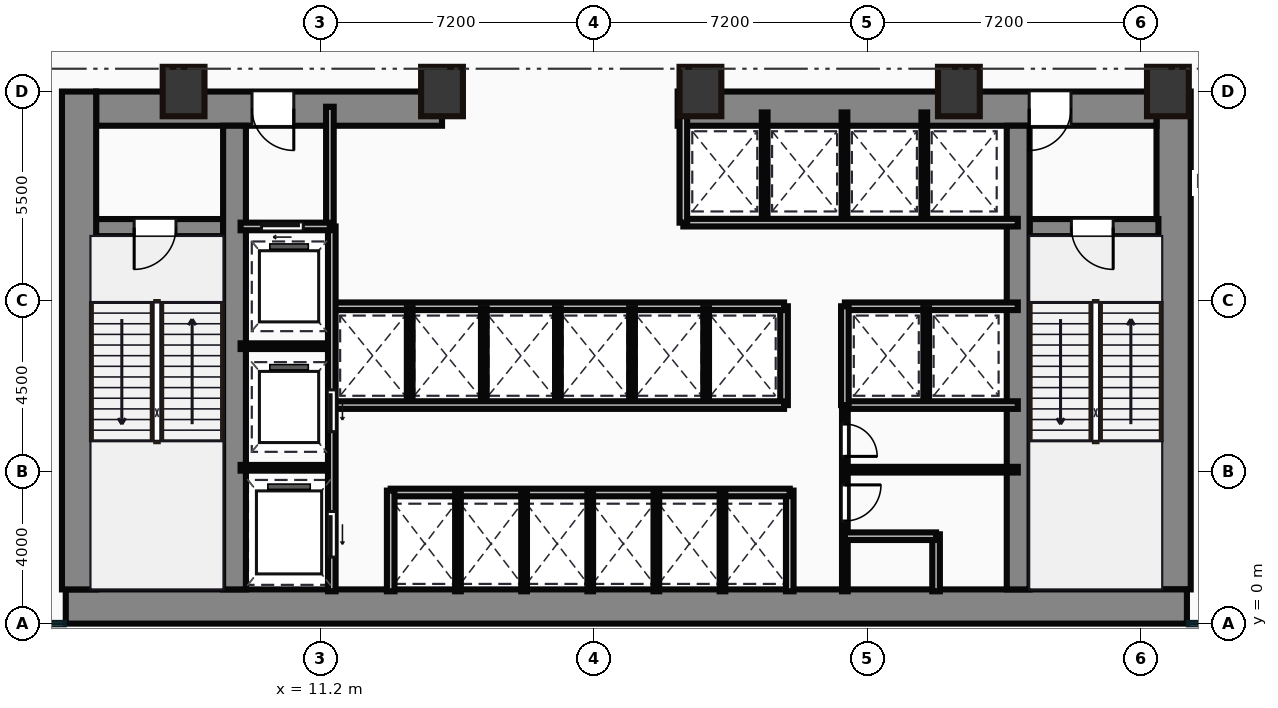
"""IFC4 building model, lengths in metres.
Left out: names, types, materials, properties, quantities, classifications, styles, units other than length and angle.
Written with IfcOpenShell. Run it as: python <this file> out.ifc"""

import sys

from ifc_helpers import new_model, si_unit, direction, frame, frame_2d, origin, origin_2d, place, context, subcontext, project, spatial, rectangle, hollow_rectangle, extrude, source, transform, mapped, element, fill, save


model = new_model("IFC4")
c1 = context("Model", 3, precision=1e-05, world=origin(), true_north=direction((0.0, 1.0)))
c2 = subcontext(c1, "Body", "Model", "MODEL_VIEW")
j1 = project(units=[si_unit("LENGTHUNIT", "METRE"), si_unit("PLANEANGLEUNIT", "RADIAN")], contexts=[c1])
p1 = place(None, origin())
s1 = spatial("IfcSite", under=j1, at=p1, CompositionType="ELEMENT")
p2 = place(p1, origin())
s2 = spatial("IfcBuilding", under=s1, at=p2, CompositionType="ELEMENT")
p3 = place(p2, frame((0.0, 0.0, 11.0)))
s3 = spatial("IfcBuildingStorey", under=s2, at=p3, CompositionType="ELEMENT", Elevation=11.0)
m1 = source(origin(), c2, "Body", "SweptSolid", [
    extrude(rectangle(XDim=29.5, YDim=0.9, at=frame_2d((14.75, 0.0))), origin(), (0.0, 0.0, 1.0), 5.0),
])
p4 = place(p3, frame((4.5, 0.45, 0.0), z_axis=(0.0, 0.0, 1.0), x_axis=(1.0, 0.0, 0.0)))
e1 = element("IfcWall", 1, at=p4, inside=s3, PredefinedType="SHEAR", context=c2, shape_type="MappedRepresentation", body=[
    mapped(m1, transform((0.0, 0.0, 0.0))),
])
m2 = source(origin(), c2, "Body", "SweptSolid", [
    extrude(rectangle(XDim=13.1, YDim=0.9, at=frame_2d((6.55, 0.0))), origin(), (0.0, 0.0, 1.0), 5.0),
])
for number, where, z_axis, x_axis in (
    (2, (4.85, 0.9, 0.0), (0.0, 0.0, 1.0), (0.0, 1.0, 0.0)),
    (3, (33.65, 0.9, 0.0), (0.0, 0.0, 1.0), (0.0, 1.0, 0.0)),
):
    element("IfcWall", number, at=place(p3, frame(where, z_axis=z_axis, x_axis=x_axis)), inside=s3, PredefinedType="SHEAR", context=c2, shape_type="MappedRepresentation", body=[
        mapped(m2, transform((0.0, 0.0, 0.0))),
    ])
m3 = source(origin(), c2, "Body", "SweptSolid", [
    extrude(rectangle(XDim=9.1, YDim=0.9, at=frame_2d((4.55, 0.0))), origin(), (0.0, 0.0, 1.0), 5.0),
])
p5 = place(p3, frame((5.3, 13.55, 0.0), z_axis=(0.0, 0.0, 1.0), x_axis=(1.0, 0.0, 0.0)))
e4 = element("IfcWall", 4, at=p5, inside=s3, PredefinedType="SHEAR", context=c2, shape_type="MappedRepresentation", body=[
    mapped(m3, transform((0.0, 0.0, 0.0))),
])
p6 = place(p5, frame((4.1, 0.0, 0.0)))
e5 = element("IfcOpeningElement", 5, at=p6, cuts=e4, PredefinedType="OPENING", context=c2, shape_type="SweptSolid", body=[
    extrude(rectangle(XDim=1.1, YDim=2.15, at=frame_2d((0.55, 1.075))), frame((0.0, 0.46, 0.0), z_axis=(0.0, -1.0, 0.0), x_axis=(1.0, 0.0, 0.0)), (0.0, 0.0, 1.0), 0.92),
])
m4 = source(origin(), c2, "Body", "SweptSolid", [
    extrude(rectangle(XDim=12.6, YDim=0.9, at=frame_2d((6.3, 0.0))), origin(), (0.0, 0.0, 1.0), 5.0),
])
p7 = place(p3, frame((20.6, 13.55, 0.0), z_axis=(0.0, 0.0, 1.0), x_axis=(1.0, 0.0, 0.0)))
e6 = element("IfcWall", 6, at=p7, inside=s3, PredefinedType="SHEAR", context=c2, shape_type="MappedRepresentation", body=[
    mapped(m4, transform((0.0, 0.0, 0.0))),
])
p8 = place(p7, frame((9.25, 0.0, 0.0)))
e7 = element("IfcOpeningElement", 7, at=p8, cuts=e6, PredefinedType="OPENING", context=c2, shape_type="SweptSolid", body=[
    extrude(rectangle(XDim=1.1, YDim=2.15, at=frame_2d((0.55, 1.075))), frame((0.0, 0.46, 0.0), z_axis=(0.0, -1.0, 0.0), x_axis=(1.0, 0.0, 0.0)), (0.0, 0.0, 1.0), 0.92),
])
m5 = source(origin(), c2, "Body", "SweptSolid", [
    extrude(rectangle(XDim=12.2, YDim=0.6, at=frame_2d((6.1, 0.0))), origin(), (0.0, 0.0, 1.0), 5.0),
])
for number, where, z_axis, x_axis in (
    (8, (8.94, 0.9, 0.0), (0.0, 0.0, 1.0), (0.0, 1.0, 0.0)),
    (9, (29.56, 0.9, 0.0), (0.0, 0.0, 1.0), (0.0, 1.0, 0.0)),
):
    element("IfcWall", number, at=place(p3, frame(where, z_axis=z_axis, x_axis=x_axis)), inside=s3, PredefinedType="SHEAR", context=c2, shape_type="MappedRepresentation", body=[
        mapped(m5, transform((0.0, 0.0, 0.0))),
    ])
m6 = source(origin(), c2, "Body", "SweptSolid", [
    extrude(rectangle(XDim=3.39, YDim=0.45, at=frame_2d((1.695, 0.0))), origin(), (0.0, 0.0, 1.0), 5.0),
])
p9 = place(p3, frame((5.25, 10.42, 0.0), z_axis=(0.0, 0.0, 1.0), x_axis=(1.0, 0.0, 0.0)))
e10 = element("IfcWall", 10, at=p9, inside=s3, PredefinedType="SHEAR", context=c2, shape_type="MappedRepresentation", body=[
    mapped(m6, transform((0.0, 0.0, 0.0))),
])
p10 = place(p9, frame((1.05, 0.0, 0.0)))
e11 = element("IfcOpeningElement", 11, at=p10, cuts=e10, PredefinedType="OPENING", context=c2, shape_type="SweptSolid", body=[
    extrude(rectangle(XDim=1.1, YDim=2.15, at=frame_2d((0.55, 1.075))), frame((0.0, 0.235, 0.0), z_axis=(0.0, -1.0, 0.0), x_axis=(1.0, 0.0, 0.0)), (0.0, 0.0, 1.0), 0.47),
])
p11 = place(p3, frame((29.86, 10.42, 0.0), z_axis=(0.0, 0.0, 1.0), x_axis=(1.0, 0.0, 0.0)))
e12 = element("IfcWall", 12, at=p11, inside=s3, PredefinedType="SHEAR", context=c2, shape_type="MappedRepresentation", body=[
    mapped(m6, transform((0.0, 0.0, 0.0))),
])
p12 = place(p11, frame((1.1, 0.0, 0.0)))
e13 = element("IfcOpeningElement", 13, at=p12, cuts=e12, PredefinedType="OPENING", context=c2, shape_type="SweptSolid", body=[
    extrude(rectangle(XDim=1.1, YDim=2.15, at=frame_2d((0.55, 1.075))), frame((0.0, 0.235, 0.0), z_axis=(0.0, -1.0, 0.0), x_axis=(1.0, 0.0, 0.0)), (0.0, 0.0, 1.0), 0.47),
])
m7 = source(origin(), c2, "Body", "SweptSolid", [
    extrude(hollow_rectangle(XDim=1.1, YDim=1.3, WallThickness=0.055, at=origin_2d()), origin(), (0.0, 0.0, 1.0), 5.0),
])
for number, where, z_axis, x_axis in (
    (14, (7.6, 14.0, 0.0), (0.0, 0.0, 1.0), (1.0, 0.0, 0.0)),
    (15, (14.4, 14.0, 0.0), (0.0, 0.0, 1.0), (1.0, 0.0, 0.0)),
    (16, (21.2, 14.0, 0.0), (0.0, 0.0, 1.0), (1.0, 0.0, 0.0)),
    (17, (28.0, 14.0, 0.0), (0.0, 0.0, 1.0), (1.0, 0.0, 0.0)),
    (18, (33.5, 14.0, 0.0), (0.0, 0.0, 1.0), (1.0, 0.0, 0.0)),
):
    element("IfcColumn", number, at=place(p3, frame(where, z_axis=z_axis, x_axis=x_axis)), inside=s3, PredefinedType="PILASTER", context=c2, shape_type="MappedRepresentation", body=[
        mapped(m7, transform((0.0, 0.0, 0.0))),
    ])
m8 = source(origin(), c2, "Body", "SweptSolid", [
    extrude(rectangle(XDim=3.18, YDim=0.2, at=frame_2d((1.59, 0.0))), origin(), (0.0, 0.0, 1.0), 4.7),
])
p13 = place(p3, frame((11.45, 10.42, 0.0), z_axis=(0.0, 0.0, 1.0), x_axis=(0.0, 1.0, 0.0)))
e19 = element("IfcWall", 19, at=p13, inside=s3, PredefinedType="PARTITIONING", context=c2, shape_type="MappedRepresentation", body=[
    mapped(m8, transform((0.0, 0.0, 0.0))),
])
m9 = source(origin(), c2, "Body", "SweptSolid", [
    extrude(rectangle(XDim=2.35, YDim=0.2, at=frame_2d((1.175, 0.0))), origin(), (0.0, 0.0, 1.0), 4.7),
])
p14 = place(p3, frame((9.1, 10.45, 0.0), z_axis=(0.0, 0.0, 1.0), x_axis=(1.0, 0.0, 0.0)))
e20 = element("IfcWall", 20, at=p14, inside=s3, PredefinedType="PARTITIONING", context=c2, shape_type="MappedRepresentation", body=[
    mapped(m9, transform((0.0, 0.0, 0.0))),
])
p15 = place(p14, frame((0.55, 0.0, 0.0)))
e21 = element("IfcOpeningElement", 21, at=p15, cuts=e20, PredefinedType="OPENING", context=c2, shape_type="SweptSolid", body=[
    extrude(rectangle(XDim=1.1, YDim=2.15, at=frame_2d((0.55, 1.075))), frame((0.0, 0.11, 0.0), z_axis=(0.0, -1.0, 0.0), x_axis=(1.0, 0.0, 0.0)), (0.0, 0.0, 1.0), 0.22),
])
m10 = source(origin(), c2, "Body", "SweptSolid", [
    extrude(rectangle(XDim=9.6, YDim=0.2, at=frame_2d((4.8, 0.0))), origin(), (0.0, 0.0, 1.0), 4.7),
])
p16 = place(p3, frame((11.5, 0.85, 0.0), z_axis=(0.0, 0.0, 1.0), x_axis=(0.0, 1.0, 0.0)))
e22 = element("IfcWall", 22, at=p16, inside=s3, PredefinedType="PARTITIONING", context=c2, shape_type="MappedRepresentation", body=[
    mapped(m10, transform((0.0, 0.0, 0.0))),
])
p17 = place(p16, frame((4.2, 0.0, 0.0)))
e23 = element("IfcOpeningElement", 23, at=p17, cuts=e22, PredefinedType="OPENING", context=c2, shape_type="SweptSolid", body=[
    extrude(rectangle(XDim=1.1, YDim=2.15, at=frame_2d((0.55, 1.075))), frame((0.0, 0.11, 0.0), z_axis=(0.0, -1.0, 0.0), x_axis=(1.0, 0.0, 0.0)), (0.0, 0.0, 1.0), 0.22),
])
p18 = place(p16, frame((0.9, 0.0, 0.0)))
e24 = element("IfcOpeningElement", 24, at=p18, cuts=e22, PredefinedType="OPENING", context=c2, shape_type="SweptSolid", body=[
    extrude(rectangle(XDim=1.2, YDim=2.15, at=frame_2d((0.6, 1.075))), frame((0.0, 0.11, 0.0), z_axis=(0.0, -1.0, 0.0), x_axis=(1.0, 0.0, 0.0)), (0.0, 0.0, 1.0), 0.22),
])
m11 = source(origin(), c2, "Body", "SweptSolid", [
    extrude(rectangle(XDim=2.4, YDim=0.15, at=frame_2d((1.2, 0.0))), origin(), (0.0, 0.0, 1.0), 4.7),
])
for number, where, z_axis, x_axis in (
    (25, (9.1, 4.1, 0.0), (0.0, 0.0, 1.0), (1.0, 0.0, 0.0)),
    (26, (9.1, 7.3, 0.0), (0.0, 0.0, 1.0), (1.0, 0.0, 0.0)),
):
    element("IfcWall", number, at=place(p3, frame(where, z_axis=z_axis, x_axis=x_axis)), inside=s3, PredefinedType="PARTITIONING", context=c2, shape_type="MappedRepresentation", body=[
        mapped(m11, transform((0.0, 0.0, 0.0))),
    ])
m12 = source(origin(), c2, "Body", "SweptSolid", [
    extrude(rectangle(XDim=2.65, YDim=0.2, at=frame_2d((1.325, 0.0))), origin(), (0.0, 0.0, 1.0), 4.7),
])
p19 = place(p3, frame((13.05, 0.85, 0.0), z_axis=(0.0, 0.0, 1.0), x_axis=(0.0, 1.0, 0.0)))
e27 = element("IfcWall", 27, at=p19, inside=s3, PredefinedType="PARTITIONING", context=c2, shape_type="MappedRepresentation", body=[
    mapped(m12, transform((0.0, 0.0, 0.0))),
])
m13 = source(origin(), c2, "Body", "SweptSolid", [
    extrude(rectangle(XDim=10.5, YDim=0.2, at=frame_2d((5.25, 0.0))), origin(), (0.0, 0.0, 1.0), 4.7),
])
p20 = place(p3, frame((13.05, 3.45, 0.0), z_axis=(0.0, 0.0, 1.0), x_axis=(1.0, 0.0, 0.0)))
e28 = element("IfcWall", 28, at=p20, inside=s3, PredefinedType="PARTITIONING", context=c2, shape_type="MappedRepresentation", body=[
    mapped(m13, transform((0.0, 0.0, 0.0))),
])
p21 = place(p3, frame((23.55, 0.85, 0.0), z_axis=(0.0, 0.0, 1.0), x_axis=(0.0, 1.0, 0.0)))
e29 = element("IfcWall", 29, at=p21, inside=s3, PredefinedType="PARTITIONING", context=c2, shape_type="MappedRepresentation", body=[
    mapped(m12, transform((0.0, 0.0, 0.0))),
])
m14 = source(origin(), c2, "Body", "SweptSolid", [
    extrude(rectangle(XDim=2.6, YDim=0.15, at=frame_2d((1.3, 0.0))), origin(), (0.0, 0.0, 1.0), 4.7),
])
for number, where, z_axis, x_axis in (
    (30, (14.82, 0.85, 0.0), (0.0, 0.0, 1.0), (0.0, 1.0, 0.0)),
    (31, (16.56, 0.85, 0.0), (0.0, 0.0, 1.0), (0.0, 1.0, 0.0)),
    (32, (18.3, 0.85, 0.0), (0.0, 0.0, 1.0), (0.0, 1.0, 0.0)),
    (33, (20.04, 0.85, 0.0), (0.0, 0.0, 1.0), (0.0, 1.0, 0.0)),
    (34, (21.78, 0.85, 0.0), (0.0, 0.0, 1.0), (0.0, 1.0, 0.0)),
):
    element("IfcWall", number, at=place(p3, frame(where, z_axis=z_axis, x_axis=x_axis)), inside=s3, PredefinedType="PARTITIONING", context=c2, shape_type="MappedRepresentation", body=[
        mapped(m14, transform((0.0, 0.0, 0.0))),
    ])
m15 = source(origin(), c2, "Body", "SweptSolid", [
    extrude(rectangle(XDim=11.85, YDim=0.2, at=frame_2d((5.925, 0.0))), origin(), (0.0, 0.0, 1.0), 4.7),
])
for number, where, z_axis, x_axis in (
    (35, (11.55, 5.75, 0.0), (0.0, 0.0, 1.0), (1.0, 0.0, 0.0)),
    (36, (11.55, 8.35, 0.0), (0.0, 0.0, 1.0), (1.0, 0.0, 0.0)),
):
    element("IfcWall", number, at=place(p3, frame(where, z_axis=z_axis, x_axis=x_axis)), inside=s3, PredefinedType="PARTITIONING", context=c2, shape_type="MappedRepresentation", body=[
        mapped(m15, transform((0.0, 0.0, 0.0))),
    ])
m16 = source(origin(), c2, "Body", "SweptSolid", [
    extrude(rectangle(XDim=2.6, YDim=0.2, at=frame_2d((1.3, 0.0))), origin(), (0.0, 0.0, 1.0), 4.7),
])
p22 = place(p3, frame((23.4, 5.75, 0.0), z_axis=(0.0, 0.0, 1.0), x_axis=(0.0, 1.0, 0.0)))
e37 = element("IfcWall", 37, at=p22, inside=s3, PredefinedType="PARTITIONING", context=c2, shape_type="MappedRepresentation", body=[
    mapped(m16, transform((0.0, 0.0, 0.0))),
])
m17 = source(origin(), c2, "Body", "SweptSolid", [
    extrude(rectangle(XDim=2.5, YDim=0.15, at=frame_2d((1.25, 0.0))), origin(), (0.0, 0.0, 1.0), 4.7),
])
for number, where, z_axis, x_axis in (
    (38, (13.55, 5.8, 0.0), (0.0, 0.0, 1.0), (0.0, 1.0, 0.0)),
    (39, (15.5, 5.8, 0.0), (0.0, 0.0, 1.0), (0.0, 1.0, 0.0)),
    (40, (17.45, 5.8, 0.0), (0.0, 0.0, 1.0), (0.0, 1.0, 0.0)),
    (41, (19.4, 5.8, 0.0), (0.0, 0.0, 1.0), (0.0, 1.0, 0.0)),
    (42, (21.35, 5.8, 0.0), (0.0, 0.0, 1.0), (0.0, 1.0, 0.0)),
):
    element("IfcWall", number, at=place(p3, frame(where, z_axis=z_axis, x_axis=x_axis)), inside=s3, PredefinedType="PARTITIONING", context=c2, shape_type="MappedRepresentation", body=[
        mapped(m17, transform((0.0, 0.0, 0.0))),
    ])
m18 = source(origin(), c2, "Body", "SweptSolid", [
    extrude(rectangle(XDim=8.8, YDim=0.2, at=frame_2d((4.4, 0.0))), origin(), (0.0, 0.0, 1.0), 4.7),
])
p23 = place(p3, frame((20.75, 10.55, 0.0), z_axis=(0.0, 0.0, 1.0), x_axis=(1.0, 0.0, 0.0)))
e43 = element("IfcWall", 43, at=p23, inside=s3, PredefinedType="PARTITIONING", context=c2, shape_type="MappedRepresentation", body=[
    mapped(m18, transform((0.0, 0.0, 0.0))),
])
m19 = source(origin(), c2, "Body", "SweptSolid", [
    extrude(rectangle(XDim=3.0, YDim=0.2, at=frame_2d((1.5, 0.0))), origin(), (0.0, 0.0, 1.0), 4.7),
])
p24 = place(p3, frame((20.75, 10.55, 0.0), z_axis=(0.0, 0.0, 1.0), x_axis=(0.0, 1.0, 0.0)))
e44 = element("IfcWall", 44, at=p24, inside=s3, PredefinedType="PARTITIONING", context=c2, shape_type="MappedRepresentation", body=[
    mapped(m19, transform((0.0, 0.0, 0.0))),
])
m20 = source(origin(), c2, "Body", "SweptSolid", [
    extrude(rectangle(XDim=2.85, YDim=0.15, at=frame_2d((1.425, 0.0))), origin(), (0.0, 0.0, 1.0), 4.7),
])
for number, where, z_axis, x_axis in (
    (45, (22.89, 10.6, 0.0), (0.0, 0.0, 1.0), (0.0, 1.0, 0.0)),
    (46, (24.99, 10.6, 0.0), (0.0, 0.0, 1.0), (0.0, 1.0, 0.0)),
    (47, (27.09, 10.6, 0.0), (0.0, 0.0, 1.0), (0.0, 1.0, 0.0)),
):
    element("IfcWall", number, at=place(p3, frame(where, z_axis=z_axis, x_axis=x_axis)), inside=s3, PredefinedType="PARTITIONING", context=c2, shape_type="MappedRepresentation", body=[
        mapped(m20, transform((0.0, 0.0, 0.0))),
    ])
m21 = source(origin(), c2, "Body", "SweptSolid", [
    extrude(rectangle(XDim=4.55, YDim=0.2, at=frame_2d((2.275, 0.0))), origin(), (0.0, 0.0, 1.0), 4.7),
])
for number, where, z_axis, x_axis in (
    (48, (25.0, 8.35, 0.0), (0.0, 0.0, 1.0), (1.0, 0.0, 0.0)),
    (49, (25.0, 5.75, 0.0), (0.0, 0.0, 1.0), (1.0, 0.0, 0.0)),
):
    element("IfcWall", number, at=place(p3, frame(where, z_axis=z_axis, x_axis=x_axis)), inside=s3, PredefinedType="PARTITIONING", context=c2, shape_type="MappedRepresentation", body=[
        mapped(m21, transform((0.0, 0.0, 0.0))),
    ])
p25 = place(p3, frame((25.0, 5.75, 0.0), z_axis=(0.0, 0.0, 1.0), x_axis=(0.0, 1.0, 0.0)))
e50 = element("IfcWall", 50, at=p25, inside=s3, PredefinedType="PARTITIONING", context=c2, shape_type="MappedRepresentation", body=[
    mapped(m16, transform((0.0, 0.0, 0.0))),
])
p26 = place(p3, frame((27.14, 5.8, 0.0), z_axis=(0.0, 0.0, 1.0), x_axis=(0.0, 1.0, 0.0)))
e51 = element("IfcWall", 51, at=p26, inside=s3, PredefinedType="PARTITIONING", context=c2, shape_type="MappedRepresentation", body=[
    mapped(m17, transform((0.0, 0.0, 0.0))),
])
m22 = source(origin(), c2, "Body", "SweptSolid", [
    extrude(rectangle(XDim=4.9, YDim=0.15, at=frame_2d((2.45, 0.0))), origin(), (0.0, 0.0, 1.0), 4.7),
])
p27 = place(p3, frame((25.0, 0.85, 0.0), z_axis=(0.0, 0.0, 1.0), x_axis=(0.0, 1.0, 0.0)))
e52 = element("IfcWall", 52, at=p27, inside=s3, PredefinedType="PARTITIONING", context=c2, shape_type="MappedRepresentation", body=[
    mapped(m22, transform((0.0, 0.0, 0.0))),
])
p28 = place(p27, frame((1.85, 0.0, 0.0)))
e53 = element("IfcOpeningElement", 53, at=p28, cuts=e52, PredefinedType="OPENING", context=c2, shape_type="SweptSolid", body=[
    extrude(rectangle(XDim=0.95, YDim=2.15, at=frame_2d((0.475, 1.075))), frame((0.0, 0.085, 0.0), z_axis=(0.0, -1.0, 0.0), x_axis=(1.0, 0.0, 0.0)), (0.0, 0.0, 1.0), 0.17),
])
p29 = place(p27, frame((3.55, 0.0, 0.0)))
e54 = element("IfcOpeningElement", 54, at=p29, cuts=e52, PredefinedType="OPENING", context=c2, shape_type="SweptSolid", body=[
    extrude(rectangle(XDim=0.85, YDim=2.15, at=frame_2d((0.425, 1.075))), frame((0.0, 0.085, 0.0), z_axis=(0.0, -1.0, 0.0), x_axis=(1.0, 0.0, 0.0)), (0.0, 0.0, 1.0), 0.17),
])
m23 = source(origin(), c2, "Body", "SweptSolid", [
    extrude(rectangle(XDim=2.4, YDim=0.2, at=frame_2d((1.2, 0.0))), origin(), (0.0, 0.0, 1.0), 4.7),
])
p30 = place(p3, frame((25.0, 2.3, 0.0), z_axis=(0.0, 0.0, 1.0), x_axis=(1.0, 0.0, 0.0)))
e55 = element("IfcWall", 55, at=p30, inside=s3, PredefinedType="PARTITIONING", context=c2, shape_type="MappedRepresentation", body=[
    mapped(m23, transform((0.0, 0.0, 0.0))),
])
m24 = source(origin(), c2, "Body", "SweptSolid", [
    extrude(rectangle(XDim=1.5, YDim=0.2, at=frame_2d((0.75, 0.0))), origin(), (0.0, 0.0, 1.0), 4.7),
])
p31 = place(p3, frame((27.4, 0.85, 0.0), z_axis=(0.0, 0.0, 1.0), x_axis=(0.0, 1.0, 0.0)))
e56 = element("IfcWall", 56, at=p31, inside=s3, PredefinedType="PARTITIONING", context=c2, shape_type="MappedRepresentation", body=[
    mapped(m24, transform((0.0, 0.0, 0.0))),
])
m25 = source(origin(), c2, "Body", "SweptSolid", [
    extrude(rectangle(XDim=4.55, YDim=0.15, at=frame_2d((2.275, 0.0))), origin(), (0.0, 0.0, 1.0), 4.7),
])
p32 = place(p3, frame((25.0, 4.05, 0.0), z_axis=(0.0, 0.0, 1.0), x_axis=(1.0, 0.0, 0.0)))
e57 = element("IfcWall", 57, at=p32, inside=s3, PredefinedType="PARTITIONING", context=c2, shape_type="MappedRepresentation", body=[
    mapped(m25, transform((0.0, 0.0, 0.0))),
])
m26 = source(origin(), c2, "Body", "SweptSolid", [
    extrude(rectangle(XDim=1.1, YDim=2.15, at=frame_2d((0.55, 1.075))), frame((0.0, 0.025, 0.0), z_axis=(0.0, -1.0, 0.0), x_axis=(1.0, 0.0, 0.0)), (0.0, 0.0, 1.0), 0.05),
])
p33 = place(p10, frame((1.1, 0.0, 0.0), z_axis=(0.0, 0.0, 1.0), x_axis=(-1.0, 0.0, 0.0)))
e58 = element("IfcDoor", 58, at=p33, inside=s3, OperationType="SINGLE_SWING_LEFT", PredefinedType="DOOR", context=c2, shape_type="MappedRepresentation", body=[
    mapped(m26, transform((0.0, 0.0, 0.0))),
])
fill(e11, e58)
p34 = place(p12, frame((1.1, 0.0, 0.0), z_axis=(0.0, 0.0, 1.0), x_axis=(-1.0, 0.0, 0.0)))
e59 = element("IfcDoor", 59, at=p34, inside=s3, OperationType="SINGLE_SWING_RIGHT", PredefinedType="DOOR", context=c2, shape_type="MappedRepresentation", body=[
    mapped(m26, transform((0.0, 0.0, 0.0))),
])
fill(e13, e59)
p35 = place(p6, origin())
e60 = element("IfcDoor", 60, at=p35, inside=s3, OperationType="SINGLE_SWING_RIGHT", PredefinedType="DOOR", context=c2, shape_type="MappedRepresentation", body=[
    mapped(m26, transform((0.0, 0.0, 0.0))),
])
fill(e5, e60)
p36 = place(p8, origin())
e61 = element("IfcDoor", 61, at=p36, inside=s3, OperationType="SINGLE_SWING_LEFT", PredefinedType="DOOR", context=c2, shape_type="MappedRepresentation", body=[
    mapped(m26, transform((0.0, 0.0, 0.0))),
])
fill(e7, e61)
p37 = place(p15, origin())
e62 = element("IfcDoor", 62, at=p37, inside=s3, OperationType="SLIDING_TO_LEFT", PredefinedType="DOOR", context=c2, shape_type="MappedRepresentation", body=[
    mapped(m26, transform((0.0, 0.0, 0.0))),
])
fill(e21, e62)
p38 = place(p17, frame((1.1, 0.0, 0.0), z_axis=(0.0, 0.0, 1.0), x_axis=(-1.0, 0.0, 0.0)))
e63 = element("IfcDoor", 63, at=p38, inside=s3, OperationType="SLIDING_TO_LEFT", PredefinedType="DOOR", context=c2, shape_type="MappedRepresentation", body=[
    mapped(m26, transform((0.0, 0.0, 0.0))),
])
fill(e23, e63)
m27 = source(origin(), c2, "Body", "SweptSolid", [
    extrude(rectangle(XDim=1.2, YDim=2.15, at=frame_2d((0.6, 1.075))), frame((0.0, 0.025, 0.0), z_axis=(0.0, -1.0, 0.0), x_axis=(1.0, 0.0, 0.0)), (0.0, 0.0, 1.0), 0.05),
])
p39 = place(p18, frame((1.2, 0.0, 0.0), z_axis=(0.0, 0.0, 1.0), x_axis=(-1.0, 0.0, 0.0)))
e64 = element("IfcDoor", 64, at=p39, inside=s3, OperationType="SLIDING_TO_LEFT", PredefinedType="DOOR", context=c2, shape_type="MappedRepresentation", body=[
    mapped(m27, transform((0.0, 0.0, 0.0))),
])
fill(e24, e64)
m28 = source(origin(), c2, "Body", "SweptSolid", [
    extrude(rectangle(XDim=0.95, YDim=2.15, at=frame_2d((0.475, 1.075))), frame((0.0, 0.025, 0.0), z_axis=(0.0, -1.0, 0.0), x_axis=(1.0, 0.0, 0.0)), (0.0, 0.0, 1.0), 0.05),
])
p40 = place(p28, origin())
e65 = element("IfcDoor", 65, at=p40, inside=s3, OperationType="SINGLE_SWING_RIGHT", PredefinedType="DOOR", context=c2, shape_type="MappedRepresentation", body=[
    mapped(m28, transform((0.0, 0.0, 0.0))),
])
fill(e53, e65)
m29 = source(origin(), c2, "Body", "SweptSolid", [
    extrude(rectangle(XDim=0.85, YDim=2.15, at=frame_2d((0.425, 1.075))), frame((0.0, 0.025, 0.0), z_axis=(0.0, -1.0, 0.0), x_axis=(1.0, 0.0, 0.0)), (0.0, 0.0, 1.0), 0.05),
])
p41 = place(p29, origin())
e66 = element("IfcDoor", 66, at=p41, inside=s3, OperationType="SINGLE_SWING_LEFT", PredefinedType="DOOR", context=c2, shape_type="MappedRepresentation", body=[
    mapped(m29, transform((0.0, 0.0, 0.0))),
])
fill(e54, e66)
save(model, sys.argv[1])
